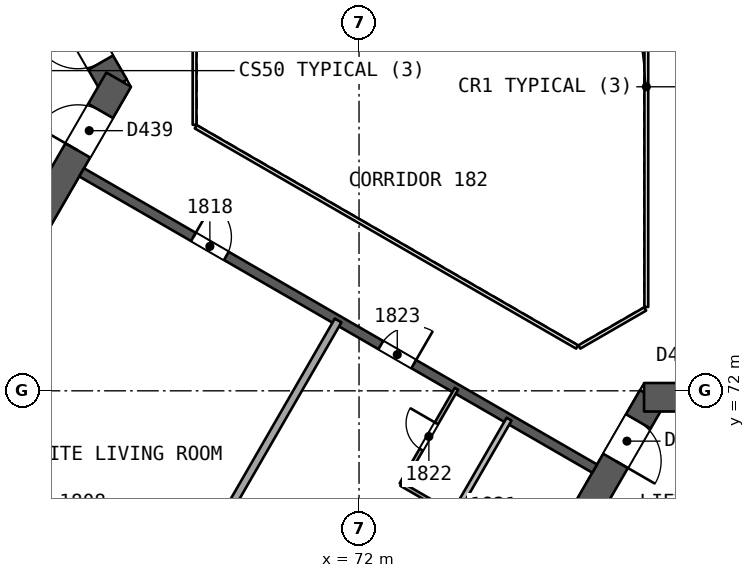
"""IFC4 building model, lengths in metres.
Left out: names, types, materials, properties, quantities, classifications, styles, units other than length and angle.
Written with IfcOpenShell. Run it as: python <this file> out.ifc"""

import sys

from ifc_helpers import new_model, si_unit, direction, frame, frame_2d, origin, place, context, subcontext, project, spatial, rectangle, extrude, element, fill, save


model = new_model("IFC4")
c1 = context("Model", 3, precision=1e-05, world=origin(), true_north=direction((0.0, 1.0)))
c2 = subcontext(c1, "Body", "Model", "MODEL_VIEW")
j1 = project(units=[si_unit("LENGTHUNIT", "METRE"), si_unit("PLANEANGLEUNIT", "RADIAN")], contexts=[c1])
p1 = place(None, origin())
s1 = spatial("IfcSite", under=j1, at=p1, CompositionType="ELEMENT")
p2 = place(p1, origin())
s2 = spatial("IfcBuilding", under=s1, at=p2, CompositionType="ELEMENT")
p3 = place(p2, frame((0.0, 0.0, 79.5)))
s3 = spatial("IfcBuildingStorey", under=s2, at=p3, CompositionType="ELEMENT", Elevation=79.5)
p4 = place(p3, frame((65.567, 80.0, 0.0), z_axis=(0.0, 0.0, 1.0), x_axis=(-0.499988615364, 0.866031976607, 0.0)))
e1 = element("IfcWall", 1, at=p4, inside=s3, PredefinedType="SHEAR", context=c2, shape_type="SweptSolid", body=[
    extrude(rectangle(XDim=10.163, YDim=0.75, at=frame_2d((5.082, 0.0))), origin(), (0.0, 0.0, 1.0), 3.7),
])
p5 = place(p4, frame((0.733, 0.0, 0.0)))
e2 = element("IfcOpeningElement", 2, at=p5, cuts=e1, PredefinedType="OPENING", context=c2, shape_type="SweptSolid", body=[
    extrude(rectangle(XDim=1.2, YDim=2.1, at=frame_2d((0.6, 1.05))), frame((0.0, 0.385, 0.0), z_axis=(0.0, -1.0, 0.0), x_axis=(1.0, 0.0, 0.0)), (0.0, 0.0, 1.0), 0.771),
])
p6 = place(p3, frame((60.673, 71.523, 0.0), z_axis=(0.0, 0.0, 1.0), x_axis=(0.499997052475, 0.866027105532, 0.0)))
e3 = element("IfcWall", 3, at=p6, inside=s3, PredefinedType="SHEAR", context=c2, shape_type="SweptSolid", body=[
    extrude(rectangle(XDim=10.005, YDim=0.75, at=frame_2d((5.002, 0.0))), origin(), (0.0, 0.0, 1.0), 3.7),
])
p7 = place(p6, frame((7.855, 0.0, 0.0)))
e4 = element("IfcOpeningElement", 4, at=p7, cuts=e3, PredefinedType="OPENING", context=c2, shape_type="SweptSolid", body=[
    extrude(rectangle(XDim=1.2, YDim=2.1, at=frame_2d((0.6, 1.05))), frame((0.0, 0.385, 0.0), z_axis=(0.0, -1.0, 0.0), x_axis=(1.0, 0.0, 0.0)), (0.0, 0.0, 1.0), 0.771),
])
p8 = place(p3, frame((79.717, 71.831, 0.0), z_axis=(0.0, 0.0, 1.0), x_axis=(-0.499996230114, -0.866027580318, 0.0)))
e5 = element("IfcWall", 5, at=p8, inside=s3, PredefinedType="SHEAR", context=c2, shape_type="SweptSolid", body=[
    extrude(rectangle(XDim=10.164, YDim=0.75, at=frame_2d((5.082, 0.0))), origin(), (0.0, 0.0, 1.0), 3.7),
])
p9 = place(p8, frame((0.733, 0.0, 0.0)))
e6 = element("IfcOpeningElement", 6, at=p9, cuts=e5, PredefinedType="OPENING", context=c2, shape_type="SweptSolid", body=[
    extrude(rectangle(XDim=1.2, YDim=2.1, at=frame_2d((0.6, 1.05))), frame((0.0, 0.385, 0.0), z_axis=(0.0, -1.0, 0.0), x_axis=(1.0, 0.0, 0.0)), (0.0, 0.0, 1.0), 0.771),
])
p10 = place(p3, frame((89.505, 71.831, 0.0), z_axis=(0.0, 0.0, 1.0), x_axis=(-1.0, 0.0, 0.0)))
e7 = element("IfcWall", 7, at=p10, inside=s3, PredefinedType="SHEAR", context=c2, shape_type="SweptSolid", body=[
    extrude(rectangle(XDim=10.005, YDim=0.75, at=frame_2d((5.002, 0.0))), origin(), (0.0, 0.0, 1.0), 3.7),
])
p11 = place(p10, frame((7.855, 0.0, 0.0)))
e8 = element("IfcOpeningElement", 8, at=p11, cuts=e7, PredefinedType="OPENING", context=c2, shape_type="SweptSolid", body=[
    extrude(rectangle(XDim=1.2, YDim=2.1, at=frame_2d((0.6, 1.05))), frame((0.0, 0.385, 0.0), z_axis=(0.0, -1.0, 0.0), x_axis=(1.0, 0.0, 0.0)), (0.0, 0.0, 1.0), 0.771),
])
p12 = place(p3, frame((64.7, 77.748, 0.0), z_axis=(0.0, 0.0, 1.0), x_axis=(0.866026492143, -0.499998114903, 0.0)))
e9 = element("IfcWall", 9, at=p12, inside=s3, PredefinedType="SHEAR", context=c2, shape_type="SweptSolid", body=[
    extrude(rectangle(XDim=15.588, YDim=0.25, at=frame_2d((7.794, 0.0))), origin(), (0.0, 0.0, 1.0), 3.2),
])
p13 = place(p12, frame((3.397, 0.0, 0.0)))
e10 = element("IfcOpeningElement", 10, at=p13, cuts=e9, PredefinedType="OPENING", context=c2, shape_type="SweptSolid", body=[
    extrude(rectangle(XDim=1.0, YDim=2.1, at=frame_2d((0.5, 1.05))), frame((0.0, 0.135, 0.0), z_axis=(0.0, -1.0, 0.0), x_axis=(1.0, 0.0, 0.0)), (0.0, 0.0, 1.0), 0.271),
])
p14 = place(p12, frame((9.091, 0.0, 0.0)))
e11 = element("IfcOpeningElement", 11, at=p14, cuts=e9, PredefinedType="OPENING", context=c2, shape_type="SweptSolid", body=[
    extrude(rectangle(XDim=1.0, YDim=2.1, at=frame_2d((0.5, 1.05))), frame((0.0, 0.135, 0.0), z_axis=(0.0, -1.0, 0.0), x_axis=(1.0, 0.0, 0.0)), (0.0, 0.0, 1.0), 0.271),
])
p15 = place(p3, frame((64.824, 62.375, 0.0), z_axis=(0.0, 0.0, 1.0), x_axis=(0.499993034499, 0.866029425281, 0.0)))
e12 = element("IfcWall", 12, at=p15, inside=s3, PredefinedType="PARTITIONING", context=c2, shape_type="SweptSolid", body=[
    extrude(rectangle(XDim=13.252, YDim=0.2, at=frame_2d((6.626, 0.0))), origin(), (0.0, 0.0, 1.0), 3.2),
])
p16 = place(p3, frame((74.498, 68.743, 0.0), z_axis=(0.0, 0.0, 1.0), x_axis=(-0.865989903783, 0.500061482766, 0.0)))
e13 = element("IfcWall", 13, at=p16, inside=s3, PredefinedType="PARTITIONING", context=c2, shape_type="SweptSolid", body=[
    extrude(rectangle(XDim=1.6, YDim=0.1, at=frame_2d((0.8, 0.0))), origin(), (0.0, 0.0, 1.0), 3.2),
])
p17 = place(p3, frame((73.113, 69.543, 0.0), z_axis=(0.0, 0.0, 1.0), x_axis=(0.499987231761, 0.866032775405, 0.0)))
e14 = element("IfcWall", 14, at=p17, inside=s3, PredefinedType="PARTITIONING", context=c2, shape_type="SweptSolid", body=[
    extrude(rectangle(XDim=2.9, YDim=0.1, at=frame_2d((1.45, 0.0))), origin(), (0.0, 0.0, 1.0), 3.2),
])
p18 = place(p17, frame((1.05, 0.0, 0.0)))
e15 = element("IfcOpeningElement", 15, at=p18, cuts=e14, PredefinedType="OPENING", context=c2, shape_type="SweptSolid", body=[
    extrude(rectangle(XDim=0.8, YDim=2.1, at=frame_2d((0.4, 1.05))), frame((0.0, 0.061, 0.0), z_axis=(0.0, -1.0, 0.0), x_axis=(1.0, 0.0, 0.0)), (0.0, 0.0, 1.0), 0.121),
])
p19 = place(p3, frame((75.948, 71.254, 0.0), z_axis=(0.0, 0.0, 1.0), x_axis=(-0.499987231761, -0.866032775405, 0.0)))
e16 = element("IfcWall", 16, at=p19, inside=s3, PredefinedType="PARTITIONING", context=c2, shape_type="SweptSolid", body=[
    extrude(rectangle(XDim=2.9, YDim=0.15, at=frame_2d((1.45, 0.0))), origin(), (0.0, 0.0, 1.0), 3.2),
])
p20 = place(p3, frame((90.276, 47.508, 0.0), z_axis=(0.0, 0.0, 1.0), x_axis=(-0.86602468924, 0.500001237625, 0.0)))
e17 = element("IfcWall", 17, at=p20, inside=s3, PredefinedType="SOLIDWALL", context=c2, shape_type="SweptSolid", body=[
    extrude(rectangle(XDim=58.951, YDim=0.3, at=frame_2d((29.476, 0.0))), origin(), (0.0, 0.0, 1.0), 3.2),
])
p21 = place(p20, frame((32.173, 0.0, 0.0)))
e18 = element("IfcOpeningElement", 18, at=p21, cuts=e17, PredefinedType="OPENING", context=c2, shape_type="SweptSolid", body=[
    extrude(rectangle(XDim=2.4, YDim=2.4, at=frame_2d((1.2, 1.2))), frame((0.0, 0.161, 0.0), z_axis=(0.0, -1.0, 0.0), x_axis=(1.0, 0.0, 0.0)), (0.0, 0.0, 1.0), 0.321),
])
p22 = place(p20, frame((45.739, 0.0, 0.0)))
e19 = element("IfcOpeningElement", 19, at=p22, cuts=e17, PredefinedType="OPENING", context=c2, shape_type="SweptSolid", body=[
    extrude(rectangle(XDim=2.4, YDim=2.4, at=frame_2d((1.2, 1.2))), frame((0.0, 0.161, 0.0), z_axis=(0.0, -1.0, 0.0), x_axis=(1.0, 0.0, 0.0)), (0.0, 0.0, 1.0), 0.321),
])
p23 = place(p20, frame((13.495, 0.0, 0.0)))
e20 = element("IfcOpeningElement", 20, at=p23, cuts=e17, PredefinedType="OPENING", context=c2, shape_type="SweptSolid", body=[
    extrude(rectangle(XDim=2.4, YDim=2.4, at=frame_2d((1.2, 1.2))), frame((0.0, 0.161, 0.0), z_axis=(0.0, -1.0, 0.0), x_axis=(1.0, 0.0, 0.0)), (0.0, 0.0, 1.0), 0.321),
])
p24 = place(p3, frame((77.135, 64.952, 0.0), z_axis=(0.0, 0.0, 1.0), x_axis=(0.866031916153, 0.499988720078, 0.0)))
e21 = element("IfcWall", 21, at=p24, inside=s3, PredefinedType="SOLIDWALL", context=c2, shape_type="SweptSolid", body=[
    extrude(rectangle(XDim=11.35, YDim=0.2, at=frame_2d((5.675, 0.0))), origin(), (0.0, 0.0, 1.0), 3.2),
])
p25 = place(p3, frame((79.56, 74.206, 0.0), z_axis=(0.0, 0.0, 1.0), x_axis=(0.0, 1.0, 0.0)))
e22 = element("IfcWall", 22, at=p25, inside=s3, PredefinedType="PARTITIONING", context=c2, shape_type="SweptSolid", body=[
    extrude(rectangle(XDim=11.588, YDim=0.1, at=frame_2d((5.794, 0.0))), origin(), (0.0, 0.0, 1.0), 3.2),
])
p26 = place(p3, frame((67.672, 81.0, 0.0), z_axis=(0.0, 0.0, 1.0), x_axis=(0.0, -1.0, 0.0)))
e23 = element("IfcWall", 23, at=p26, inside=s3, PredefinedType="PARTITIONING", context=c2, shape_type="SweptSolid", body=[
    extrude(rectangle(XDim=2.0, YDim=0.1, at=frame_2d((1.0, 0.0))), origin(), (0.0, 0.0, 1.0), 3.2),
])
p27 = place(p3, frame((67.702, 78.948, 0.0), z_axis=(0.0, 0.0, 1.0), x_axis=(0.866026658274, -0.499997827154, 0.0)))
e24 = element("IfcWall", 24, at=p27, inside=s3, PredefinedType="PARTITIONING", context=c2, shape_type="SweptSolid", body=[
    extrude(rectangle(XDim=11.588, YDim=0.1, at=frame_2d((5.794, 0.0))), origin(), (0.0, 0.0, 1.0), 3.2),
])
p28 = place(p3, frame((77.798, 73.154, 0.0), z_axis=(0.0, 0.0, 1.0), x_axis=(0.866041268327, 0.499972520799, 0.0)))
e25 = element("IfcWall", 25, at=p28, inside=s3, PredefinedType="PARTITIONING", context=c2, shape_type="SweptSolid", body=[
    extrude(rectangle(XDim=2.0, YDim=0.1, at=frame_2d((1.0, 0.0))), origin(), (0.0, 0.0, 1.0), 3.2),
])
p29 = place(p13, origin())
e26 = element("IfcDoor", 26, at=p29, inside=s3, OperationType="SINGLE_SWING_LEFT", PredefinedType="NOTDEFINED", context=c2, shape_type="SweptSolid", body=[
    extrude(rectangle(XDim=1.0, YDim=2.1, at=frame_2d((0.5, 1.05))), frame((0.0, 0.025, 0.0), z_axis=(0.0, -1.0, 0.0), x_axis=(1.0, 0.0, 0.0)), (0.0, 0.0, 1.0), 0.05),
])
fill(e10, e26)
p30 = place(p18, origin())
e27 = element("IfcDoor", 27, at=p30, inside=s3, OperationType="SINGLE_SWING_RIGHT", PredefinedType="NOTDEFINED", context=c2, shape_type="SweptSolid", body=[
    extrude(rectangle(XDim=0.8, YDim=2.1, at=frame_2d((0.4, 1.05))), frame((0.0, 0.025, 0.0), z_axis=(0.0, -1.0, 0.0), x_axis=(1.0, 0.0, 0.0)), (0.0, 0.0, 1.0), 0.05),
])
fill(e15, e27)
p31 = place(p14, origin())
e28 = element("IfcDoor", 28, at=p31, inside=s3, OperationType="SINGLE_SWING_RIGHT", PredefinedType="NOTDEFINED", context=c2, shape_type="SweptSolid", body=[
    extrude(rectangle(XDim=1.0, YDim=2.1, at=frame_2d((0.5, 1.05))), frame((0.0, 0.025, 0.0), z_axis=(0.0, -1.0, 0.0), x_axis=(1.0, 0.0, 0.0)), (0.0, 0.0, 1.0), 0.05),
])
fill(e11, e28)
p32 = place(p5, origin())
e29 = element("IfcDoor", 29, at=p32, inside=s3, OperationType="SINGLE_SWING_RIGHT", PredefinedType="NOTDEFINED", context=c2, shape_type="SweptSolid", body=[
    extrude(rectangle(XDim=1.2, YDim=2.1, at=frame_2d((0.6, 1.05))), frame((0.0, 0.025, 0.0), z_axis=(0.0, -1.0, 0.0), x_axis=(1.0, 0.0, 0.0)), (0.0, 0.0, 1.0), 0.05),
])
fill(e2, e29)
p33 = place(p7, origin())
e30 = element("IfcDoor", 30, at=p33, inside=s3, OperationType="SINGLE_SWING_LEFT", PredefinedType="NOTDEFINED", context=c2, shape_type="SweptSolid", body=[
    extrude(rectangle(XDim=1.2, YDim=2.1, at=frame_2d((0.6, 1.05))), frame((0.0, 0.025, 0.0), z_axis=(0.0, -1.0, 0.0), x_axis=(1.0, 0.0, 0.0)), (0.0, 0.0, 1.0), 0.05),
])
fill(e4, e30)
p34 = place(p9, origin())
e31 = element("IfcDoor", 31, at=p34, inside=s3, OperationType="SINGLE_SWING_RIGHT", PredefinedType="NOTDEFINED", context=c2, shape_type="SweptSolid", body=[
    extrude(rectangle(XDim=1.2, YDim=2.1, at=frame_2d((0.6, 1.05))), frame((0.0, 0.025, 0.0), z_axis=(0.0, -1.0, 0.0), x_axis=(1.0, 0.0, 0.0)), (0.0, 0.0, 1.0), 0.05),
])
fill(e6, e31)
save(model, sys.argv[1])
